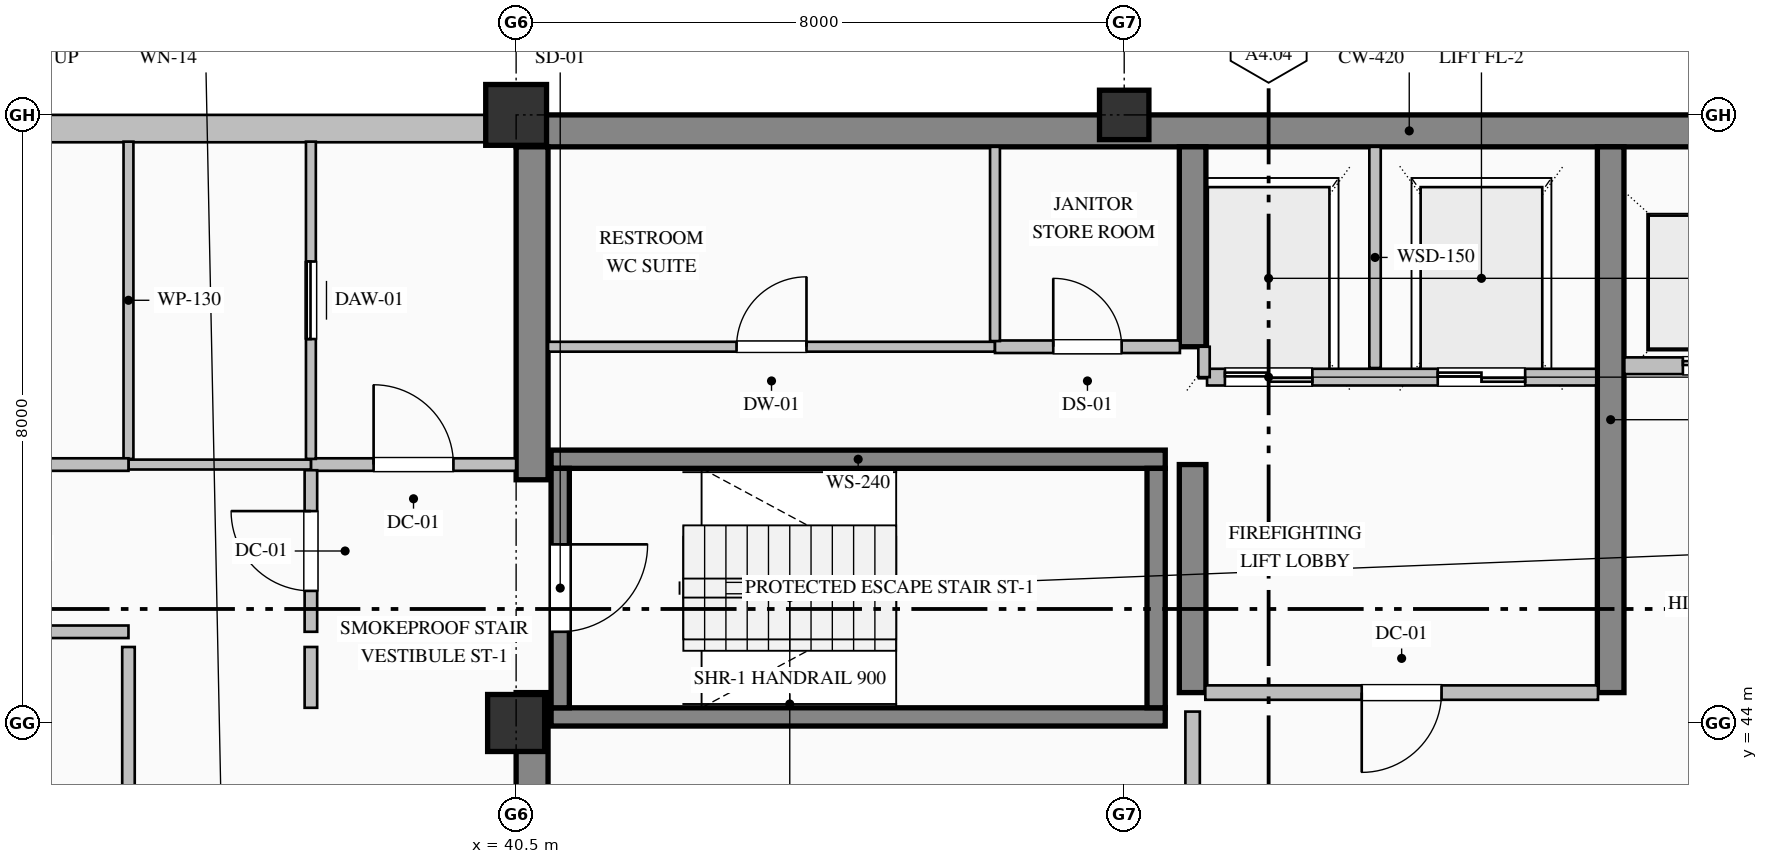
"""IFC4 building model, lengths in metres.
Left out: names, types, materials, properties, quantities, classifications, styles, units other than length and angle.
Written with IfcOpenShell. Run it as: python <this file> out.ifc"""

import sys

from ifc_helpers import new_model, si_unit, direction, frame, frame_2d, origin, origin_2d, place, context, subcontext, project, spatial, rectangle, hollow_rectangle, extrude, element, fill, save


model = new_model("IFC4")
c1 = context("Model", 3, precision=1e-05, world=origin(), true_north=direction((0.0, 1.0)))
c2 = subcontext(c1, "Body", "Model", "MODEL_VIEW")
j1 = project(units=[si_unit("LENGTHUNIT", "METRE"), si_unit("PLANEANGLEUNIT", "RADIAN")], contexts=[c1])
p1 = place(None, origin())
s1 = spatial("IfcSite", under=j1, at=p1, CompositionType="ELEMENT")
p2 = place(p1, origin())
s2 = spatial("IfcBuilding", under=s1, at=p2, CompositionType="ELEMENT")
p3 = place(p2, frame((0.0, 0.0, 323.2)))
s3 = spatial("IfcBuildingStorey", under=s2, at=p3, CompositionType="ELEMENT", Elevation=323.2)
p4 = place(p3, frame((40.5, 51.79, 0.0), z_axis=(0.0, 0.0, 1.0), x_axis=(1.0, 0.0, 0.0)))
e1 = element("IfcWall", 1, at=p4, inside=s3, PredefinedType="SHEAR", context=c2, shape_type="SweptSolid", body=[
    extrude(rectangle(XDim=23.5, YDim=0.42, at=frame_2d((11.75, 0.0))), origin(), (0.0, 0.0, 1.0), 3.785),
])
p5 = place(p3, frame((40.71, 36.42, 0.0), z_axis=(0.0, 0.0, 1.0), x_axis=(0.0, 1.0, 0.0)))
e2 = element("IfcWall", 2, at=p5, inside=s3, PredefinedType="SHEAR", context=c2, shape_type="SweptSolid", body=[
    extrude(rectangle(XDim=7.98, YDim=0.42, at=frame_2d((3.99, 0.0))), origin(), (0.0, 0.0, 1.0), 3.785),
])
p6 = place(p3, frame((40.71, 47.2, 0.0), z_axis=(0.0, 0.0, 1.0), x_axis=(0.0, 1.0, 0.0)))
e3 = element("IfcWall", 3, at=p6, inside=s3, PredefinedType="SHEAR", context=c2, shape_type="SweptSolid", body=[
    extrude(rectangle(XDim=4.38, YDim=0.42, at=frame_2d((2.19, 0.0))), origin(), (0.0, 0.0, 1.0), 3.785),
])
p7 = place(p3, frame((49.4, 44.4, 0.0), z_axis=(0.0, 0.0, 1.0), x_axis=(0.0, 1.0, 0.0)))
e4 = element("IfcWall", 4, at=p7, inside=s3, PredefinedType="SHEAR", context=c2, shape_type="SweptSolid", body=[
    extrude(rectangle(XDim=3.0, YDim=0.35, at=frame_2d((1.5, 0.0))), origin(), (0.0, 0.0, 1.0), 3.785),
])
p8 = place(p3, frame((49.4, 48.95, 0.0), z_axis=(0.0, 0.0, 1.0), x_axis=(0.0, 1.0, 0.0)))
e5 = element("IfcWall", 5, at=p8, inside=s3, PredefinedType="SHEAR", context=c2, shape_type="SweptSolid", body=[
    extrude(rectangle(XDim=2.63, YDim=0.35, at=frame_2d((1.315, 0.0))), origin(), (0.0, 0.0, 1.0), 3.785),
])
p9 = place(p3, frame((54.9, 44.4, 0.0), z_axis=(0.0, 0.0, 1.0), x_axis=(0.0, 1.0, 0.0)))
e6 = element("IfcWall", 6, at=p9, inside=s3, PredefinedType="SHEAR", context=c2, shape_type="SweptSolid", body=[
    extrude(rectangle(XDim=7.18, YDim=0.35, at=frame_2d((3.59, 0.0))), origin(), (0.0, 0.0, 1.0), 3.785),
])
p10 = place(p3, frame((40.5, 44.0, 0.0), z_axis=(0.0, 0.0, 1.0), x_axis=(1.0, 0.0, 0.0)))
e7 = element("IfcColumn", 7, at=p10, inside=s3, PredefinedType="COLUMN", context=c2, shape_type="SweptSolid", body=[
    extrude(rectangle(XDim=0.75, YDim=0.75, at=origin_2d()), origin(), (0.0, 0.0, 1.0), 4.0),
])
p11 = place(p3, frame((40.5, 52.0, 0.0), z_axis=(0.0, 0.0, 1.0), x_axis=(1.0, 0.0, 0.0)))
e8 = element("IfcColumn", 8, at=p11, inside=s3, PredefinedType="COLUMN", context=c2, shape_type="SweptSolid", body=[
    extrude(hollow_rectangle(XDim=0.8, YDim=0.8, WallThickness=0.032, at=origin_2d()), origin(), (0.0, 0.0, 1.0), 4.0),
])
p12 = place(p3, frame((48.5, 52.0, 0.0), z_axis=(0.0, 0.0, 1.0), x_axis=(1.0, 0.0, 0.0)))
e9 = element("IfcColumn", 9, at=p12, inside=s3, PredefinedType="COLUMN", context=c2, shape_type="SweptSolid", body=[
    extrude(hollow_rectangle(XDim=0.65, YDim=0.65, WallThickness=0.028, at=origin_2d()), origin(), (0.0, 0.0, 1.0), 4.0),
])
p13 = place(p3, frame((20.5, 51.82, 0.0), z_axis=(0.0, 0.0, 1.0), x_axis=(1.0, 0.0, 0.0)))
e10 = element("IfcWall", 10, at=p13, inside=s3, PredefinedType="SOLIDWALL", context=c2, shape_type="SweptSolid", body=[
    extrude(rectangle(XDim=20.02, YDim=0.36, at=frame_2d((10.01, 0.0))), origin(), (0.0, 0.0, 1.0), 3.335),
])
p14 = place(p13, frame((6.725, 0.0, 0.9)))
e11 = element("IfcOpeningElement", 11, at=p14, cuts=e10, PredefinedType="OPENING", context=c2, shape_type="SweptSolid", body=[
    extrude(rectangle(XDim=0.95, YDim=1.85, at=frame_2d((0.475, 0.925))), frame((0.0, 0.19, 0.0), z_axis=(0.0, -1.0, 0.0), x_axis=(1.0, 0.0, 0.0)), (0.0, 0.0, 1.0), 0.38),
])
for number, where, z_axis, x_axis in (
    (12, (40.96, 47.47, 0.0), (0.0, 0.0, 1.0), (1.0, 0.0, 0.0)),
    (13, (49.04, 44.08, 0.0), (0.0, 0.0, 1.0), (-1.0, 0.0, 0.0)),
):
    element("IfcWall", number, at=place(p3, frame(where, z_axis=z_axis, x_axis=x_axis)), inside=s3, PredefinedType="SOLIDWALL", context=c2, shape_type="SweptSolid", body=[
        extrude(rectangle(XDim=8.08, YDim=0.24, at=frame_2d((4.04, 0.0))), origin(), (0.0, 0.0, 1.0), 4.0),
    ])
p15 = place(p3, frame((41.08, 47.35, 0.0), z_axis=(0.0, 0.0, 1.0), x_axis=(0.0, -1.0, 0.0)))
e14 = element("IfcWall", 14, at=p15, inside=s3, PredefinedType="SOLIDWALL", context=c2, shape_type="SweptSolid", body=[
    extrude(rectangle(XDim=3.15, YDim=0.24, at=frame_2d((1.575, 0.0))), origin(), (0.0, 0.0, 1.0), 4.0),
])
p16 = place(p15, frame((1.0, 0.0, 0.0)))
e15 = element("IfcOpeningElement", 15, at=p16, cuts=e14, PredefinedType="OPENING", context=c2, shape_type="SweptSolid", body=[
    extrude(rectangle(XDim=1.15, YDim=2.2, at=frame_2d((0.575, 1.1))), frame((0.0, 0.13, 0.0), z_axis=(0.0, -1.0, 0.0), x_axis=(1.0, 0.0, 0.0)), (0.0, 0.0, 1.0), 0.26),
])
p17 = place(p3, frame((48.92, 44.2, 0.0), z_axis=(0.0, 0.0, 1.0), x_axis=(0.0, 1.0, 0.0)))
e16 = element("IfcWall", 16, at=p17, inside=s3, PredefinedType="SOLIDWALL", context=c2, shape_type="SweptSolid", body=[
    extrude(rectangle(XDim=3.15, YDim=0.24, at=frame_2d((1.575, 0.0))), origin(), (0.0, 0.0, 1.0), 4.0),
])
p18 = place(p3, frame((54.71, 48.55, 0.0), z_axis=(0.0, 0.0, 1.0), x_axis=(-1.0, 0.0, 0.0)))
e17 = element("IfcWall", 17, at=p18, inside=s3, PredefinedType="PARTITIONING", context=c2, shape_type="SweptSolid", body=[
    extrude(rectangle(XDim=5.12, YDim=0.22, at=frame_2d((2.56, 0.0))), origin(), (0.0, 0.0, 1.0), 3.785),
])
p19 = place(p18, frame((3.735, 0.0, 0.0)))
e18 = element("IfcOpeningElement", 18, at=p19, cuts=e17, PredefinedType="OPENING", context=c2, shape_type="SweptSolid", body=[
    extrude(rectangle(XDim=1.15, YDim=2.2, at=frame_2d((0.575, 1.1))), frame((0.0, 0.12, 0.0), z_axis=(0.0, -1.0, 0.0), x_axis=(1.0, 0.0, 0.0)), (0.0, 0.0, 1.0), 0.24),
])
p20 = place(p18, frame((0.935, 0.0, 0.0)))
e19 = element("IfcOpeningElement", 19, at=p20, cuts=e17, PredefinedType="OPENING", context=c2, shape_type="SweptSolid", body=[
    extrude(rectangle(XDim=1.15, YDim=2.2, at=frame_2d((0.575, 1.1))), frame((0.0, 0.12, 0.0), z_axis=(0.0, -1.0, 0.0), x_axis=(1.0, 0.0, 0.0)), (0.0, 0.0, 1.0), 0.24),
])
p21 = place(p3, frame((51.8, 48.67, 0.0), z_axis=(0.0, 0.0, 1.0), x_axis=(0.0, 1.0, 0.0)))
e20 = element("IfcWall", 20, at=p21, inside=s3, PredefinedType="PARTITIONING", context=c2, shape_type="SweptSolid", body=[
    extrude(rectangle(XDim=2.91, YDim=0.15, at=frame_2d((1.455, 0.0))), origin(), (0.0, 0.0, 1.0), 3.785),
])
p22 = place(p3, frame((49.55, 48.55, 0.0), z_axis=(0.0, 0.0, 1.0), x_axis=(0.0, 1.0, 0.0)))
e21 = element("IfcWall", 21, at=p22, inside=s3, PredefinedType="PARTITIONING", context=c2, shape_type="SweptSolid", body=[
    extrude(rectangle(XDim=0.4, YDim=0.15, at=frame_2d((0.2, 0.0))), origin(), (0.0, 0.0, 1.0), 3.785),
])
p23 = place(p3, frame((63.32, 48.7, 0.0), z_axis=(0.0, 0.0, 1.0), x_axis=(-1.0, 0.0, 0.0)))
e22 = element("IfcWall", 22, at=p23, inside=s3, PredefinedType="PARTITIONING", context=c2, shape_type="SweptSolid", body=[
    extrude(rectangle(XDim=8.24, YDim=0.22, at=frame_2d((4.12, 0.0))), origin(), (0.0, 0.0, 1.0), 3.785),
])
p24 = place(p23, frame((6.37, 0.0, 0.0)))
e23 = element("IfcOpeningElement", 23, at=p24, cuts=e22, PredefinedType="OPENING", context=c2, shape_type="SweptSolid", body=[
    extrude(rectangle(XDim=1.1, YDim=2.2, at=frame_2d((0.55, 1.1))), frame((0.0, 0.12, 0.0), z_axis=(0.0, -1.0, 0.0), x_axis=(1.0, 0.0, 0.0)), (0.0, 0.0, 1.0), 0.24),
])
p25 = place(p23, frame((3.57, 0.0, 0.0)))
e24 = element("IfcOpeningElement", 24, at=p25, cuts=e22, PredefinedType="OPENING", context=c2, shape_type="SweptSolid", body=[
    extrude(rectangle(XDim=1.1, YDim=2.2, at=frame_2d((0.55, 1.1))), frame((0.0, 0.12, 0.0), z_axis=(0.0, -1.0, 0.0), x_axis=(1.0, 0.0, 0.0)), (0.0, 0.0, 1.0), 0.24),
])
p26 = place(p23, frame((0.77, 0.0, 0.0)))
e25 = element("IfcOpeningElement", 25, at=p26, cuts=e22, PredefinedType="OPENING", context=c2, shape_type="SweptSolid", body=[
    extrude(rectangle(XDim=1.1, YDim=2.2, at=frame_2d((0.55, 1.1))), frame((0.0, 0.12, 0.0), z_axis=(0.0, -1.0, 0.0), x_axis=(1.0, 0.0, 0.0)), (0.0, 0.0, 1.0), 0.24),
])
p27 = place(p3, frame((37.8, 47.4, 0.0), z_axis=(0.0, 0.0, 1.0), x_axis=(1.0, 0.0, 0.0)))
e26 = element("IfcWall", 26, at=p27, inside=s3, PredefinedType="PARTITIONING", context=c2, shape_type="SweptSolid", body=[
    extrude(rectangle(XDim=2.7, YDim=0.165, at=frame_2d((1.35, 0.0))), origin(), (0.0, 0.0, 1.0), 3.785),
])
p28 = place(p27, frame((0.825, 0.0, 0.0)))
e27 = element("IfcOpeningElement", 27, at=p28, cuts=e26, PredefinedType="OPENING", context=c2, shape_type="SweptSolid", body=[
    extrude(rectangle(XDim=1.05, YDim=2.15, at=frame_2d((0.525, 1.075))), frame((0.0, 0.093, 0.0), z_axis=(0.0, -1.0, 0.0), x_axis=(1.0, 0.0, 0.0)), (0.0, 0.0, 1.0), 0.185),
])
p29 = place(p3, frame((37.8, 45.2, 0.0), z_axis=(0.0, 0.0, 1.0), x_axis=(0.0, 1.0, 0.0)))
e28 = element("IfcWall", 28, at=p29, inside=s3, PredefinedType="PARTITIONING", context=c2, shape_type="SweptSolid", body=[
    extrude(rectangle(XDim=2.125, YDim=0.165, at=frame_2d((1.063, 0.0))), origin(), (0.0, 0.0, 1.0), 3.785),
])
p30 = place(p29, frame((0.538, 0.0, 0.0)))
e29 = element("IfcOpeningElement", 29, at=p30, cuts=e28, PredefinedType="OPENING", context=c2, shape_type="SweptSolid", body=[
    extrude(rectangle(XDim=1.05, YDim=2.15, at=frame_2d((0.525, 1.075))), frame((0.0, 0.093, 0.0), z_axis=(0.0, -1.0, 0.0), x_axis=(1.0, 0.0, 0.0)), (0.0, 0.0, 1.0), 0.185),
])
p31 = place(p3, frame((37.8, 44.2, 0.0), z_axis=(0.0, 0.0, 1.0), x_axis=(0.0, 1.0, 0.0)))
e30 = element("IfcWall", 30, at=p31, inside=s3, PredefinedType="PARTITIONING", context=c2, shape_type="SweptSolid", body=[
    extrude(rectangle(XDim=0.8, YDim=0.165, at=frame_2d((0.4, 0.0))), origin(), (0.0, 0.0, 1.0), 3.785),
])
p32 = place(p3, frame((37.8, 47.475, 0.0), z_axis=(0.0, 0.0, 1.0), x_axis=(0.0, 1.0, 0.0)))
e31 = element("IfcWall", 31, at=p32, inside=s3, PredefinedType="PARTITIONING", context=c2, shape_type="SweptSolid", body=[
    extrude(rectangle(XDim=4.173, YDim=0.13, at=frame_2d((2.087, 0.0))), origin(), (0.0, 0.0, 1.0), 3.785),
])
p33 = place(p32, frame((1.577, 0.0, 0.0)))
e32 = element("IfcOpeningElement", 32, at=p33, cuts=e31, PredefinedType="OPENING", context=c2, shape_type="SweptSolid", body=[
    extrude(rectangle(XDim=1.02, YDim=2.15, at=frame_2d((0.51, 1.075))), frame((0.0, 0.075, 0.0), z_axis=(0.0, -1.0, 0.0), x_axis=(1.0, 0.0, 0.0)), (0.0, 0.0, 1.0), 0.15),
])
p34 = place(p3, frame((37.8, 47.4, 0.0), z_axis=(0.0, 0.0, 1.0), x_axis=(-1.0, 0.0, 0.0)))
e33 = element("IfcWall", 33, at=p34, inside=s3, PredefinedType="PARTITIONING", context=c2, shape_type="SweptSolid", body=[
    extrude(rectangle(XDim=2.4, YDim=0.13, at=frame_2d((1.2, 0.0))), origin(), (0.0, 0.0, 1.0), 3.785),
])
p35 = place(p3, frame((35.4, 47.475, 0.0), z_axis=(0.0, 0.0, 1.0), x_axis=(0.0, 1.0, 0.0)))
e34 = element("IfcWall", 34, at=p35, inside=s3, PredefinedType="PARTITIONING", context=c2, shape_type="SweptSolid", body=[
    extrude(rectangle(XDim=4.173, YDim=0.13, at=frame_2d((2.087, 0.0))), origin(), (0.0, 0.0, 1.0), 3.785),
])
p36 = place(p3, frame((40.92, 48.95, 0.0), z_axis=(0.0, 0.0, 1.0), x_axis=(1.0, 0.0, 0.0)))
e35 = element("IfcWall", 35, at=p36, inside=s3, PredefinedType="PARTITIONING", context=c2, shape_type="SweptSolid", body=[
    extrude(rectangle(XDim=5.88, YDim=0.13, at=frame_2d((2.94, 0.0))), origin(), (0.0, 0.0, 1.0), 3.785),
])
p37 = place(p36, frame((2.48, 0.0, 0.0)))
e36 = element("IfcOpeningElement", 36, at=p37, cuts=e35, PredefinedType="OPENING", context=c2, shape_type="SweptSolid", body=[
    extrude(rectangle(XDim=0.92, YDim=2.15, at=frame_2d((0.46, 1.075))), frame((0.0, 0.075, 0.0), z_axis=(0.0, -1.0, 0.0), x_axis=(1.0, 0.0, 0.0)), (0.0, 0.0, 1.0), 0.15),
])
p38 = place(p3, frame((46.8, 48.95, 0.0), z_axis=(0.0, 0.0, 1.0), x_axis=(1.0, 0.0, 0.0)))
e37 = element("IfcWall", 37, at=p38, inside=s3, PredefinedType="PARTITIONING", context=c2, shape_type="SweptSolid", body=[
    extrude(rectangle(XDim=2.433, YDim=0.165, at=frame_2d((1.216, 0.0))), origin(), (0.0, 0.0, 1.0), 3.785),
])
p39 = place(p38, frame((0.767, 0.0, 0.0)))
e38 = element("IfcOpeningElement", 38, at=p39, cuts=e37, PredefinedType="OPENING", context=c2, shape_type="SweptSolid", body=[
    extrude(rectangle(XDim=0.9, YDim=2.15, at=frame_2d((0.45, 1.075))), frame((0.0, 0.093, 0.0), z_axis=(0.0, -1.0, 0.0), x_axis=(1.0, 0.0, 0.0)), (0.0, 0.0, 1.0), 0.185),
])
p40 = place(p3, frame((54.733, 44.4, 0.0), z_axis=(0.0, 0.0, 1.0), x_axis=(-1.0, 0.0, 0.0)))
e39 = element("IfcWall", 39, at=p40, inside=s3, PredefinedType="PARTITIONING", context=c2, shape_type="SweptSolid", body=[
    extrude(rectangle(XDim=5.166, YDim=0.19, at=frame_2d((2.583, 0.0))), origin(), (0.0, 0.0, 1.0), 3.785),
])
p41 = place(p40, frame((2.058, 0.0, 0.0)))
e40 = element("IfcOpeningElement", 40, at=p41, cuts=e39, PredefinedType="OPENING", context=c2, shape_type="SweptSolid", body=[
    extrude(rectangle(XDim=1.05, YDim=2.15, at=frame_2d((0.525, 1.075))), frame((0.0, 0.105, 0.0), z_axis=(0.0, -1.0, 0.0), x_axis=(1.0, 0.0, 0.0)), (0.0, 0.0, 1.0), 0.21),
])
p42 = place(p3, frame((49.4, 40.487, 0.0), z_axis=(0.0, 0.0, 1.0), x_axis=(0.0, 1.0, 0.0)))
e41 = element("IfcWall", 41, at=p42, inside=s3, PredefinedType="PARTITIONING", context=c2, shape_type="SweptSolid", body=[
    extrude(rectangle(XDim=3.663, YDim=0.19, at=frame_2d((1.832, 0.0))), origin(), (0.0, 0.0, 1.0), 3.027),
])
p43 = place(p42, frame((1.132, 0.0, 0.0)))
e42 = element("IfcOpeningElement", 42, at=p43, cuts=e41, PredefinedType="OPENING", context=c2, shape_type="SweptSolid", body=[
    extrude(rectangle(XDim=1.4, YDim=2.25, at=frame_2d((0.7, 1.125))), frame((0.0, 0.105, 0.0), z_axis=(0.0, -1.0, 0.0), x_axis=(1.0, 0.0, 0.0)), (0.0, 0.0, 1.0), 0.21),
])
p44 = place(p3, frame((46.8, 51.58, 0.0), z_axis=(0.0, 0.0, 1.0), x_axis=(0.0, -1.0, 0.0)))
e43 = element("IfcWall", 43, at=p44, inside=s3, PredefinedType="PARTITIONING", context=c2, shape_type="SweptSolid", body=[
    extrude(rectangle(XDim=2.556, YDim=0.13, at=frame_2d((1.278, 0.0))), origin(), (0.0, 0.0, 1.0), 3.785),
])
p45 = place(p3, frame((24.5, 47.4, 0.0), z_axis=(0.0, 0.0, 1.0), x_axis=(1.0, 0.0, 0.0)))
e44 = element("IfcWall", 44, at=p45, inside=s3, PredefinedType="PARTITIONING", context=c2, shape_type="SweptSolid", body=[
    extrude(rectangle(XDim=10.9, YDim=0.165, at=frame_2d((5.45, 0.0))), origin(), (0.0, 0.0, 1.0), 3.785),
])
p46 = place(p45, frame((5.0, 0.0, 0.0)))
e45 = element("IfcOpeningElement", 45, at=p46, cuts=e44, PredefinedType="OPENING", context=c2, shape_type="SweptSolid", body=[
    extrude(rectangle(XDim=0.9, YDim=2.15, at=frame_2d((0.45, 1.075))), frame((0.0, 0.093, 0.0), z_axis=(0.0, -1.0, 0.0), x_axis=(1.0, 0.0, 0.0)), (0.0, 0.0, 1.0), 0.185),
])
p47 = place(p3, frame((35.4, 45.2, 0.0), z_axis=(0.0, 0.0, 1.0), x_axis=(-1.0, 0.0, 0.0)))
e46 = element("IfcWall", 46, at=p47, inside=s3, PredefinedType="PARTITIONING", context=c2, shape_type="SweptSolid", body=[
    extrude(rectangle(XDim=4.4, YDim=0.165, at=frame_2d((2.2, 0.0))), origin(), (0.0, 0.0, 1.0), 3.785),
])
p48 = place(p3, frame((35.4, 33.6, 0.0), z_axis=(0.0, 0.0, 1.0), x_axis=(0.0, 1.0, 0.0)))
e47 = element("IfcWall", 47, at=p48, inside=s3, PredefinedType="PARTITIONING", context=c2, shape_type="SweptSolid", body=[
    extrude(rectangle(XDim=11.4, YDim=0.165, at=frame_2d((5.7, 0.0))), origin(), (0.0, 0.0, 1.0), 3.785),
])
p49 = place(p48, frame((5.2, 0.0, 0.0)))
e48 = element("IfcOpeningElement", 48, at=p49, cuts=e47, PredefinedType="OPENING", context=c2, shape_type="SweptSolid", body=[
    extrude(rectangle(XDim=1.0, YDim=2.15, at=frame_2d((0.5, 1.075))), frame((0.0, 0.093, 0.0), z_axis=(0.0, -1.0, 0.0), x_axis=(1.0, 0.0, 0.0)), (0.0, 0.0, 1.0), 0.185),
])
p50 = place(p16, origin())
e49 = element("IfcDoor", 49, at=p50, inside=s3, OperationType="SINGLE_SWING_LEFT", PredefinedType="DOOR", context=c2, shape_type="SweptSolid", body=[
    extrude(rectangle(XDim=1.15, YDim=2.2, at=frame_2d((0.575, 1.1))), frame((0.0, 0.025, 0.0), z_axis=(0.0, -1.0, 0.0), x_axis=(1.0, 0.0, 0.0)), (0.0, 0.0, 1.0), 0.05),
])
fill(e15, e49)
p51 = place(p19, origin())
e50 = element("IfcDoor", 50, at=p51, inside=s3, OperationType="DOUBLE_DOOR_SLIDING", PredefinedType="DOOR", context=c2, shape_type="SweptSolid", body=[
    extrude(rectangle(XDim=1.15, YDim=2.2, at=frame_2d((0.575, 1.1))), frame((0.0, 0.025, 0.0), z_axis=(0.0, -1.0, 0.0), x_axis=(1.0, 0.0, 0.0)), (0.0, 0.0, 1.0), 0.05),
])
fill(e18, e50)
p52 = place(p20, origin())
e51 = element("IfcDoor", 51, at=p52, inside=s3, OperationType="DOUBLE_DOOR_SLIDING", PredefinedType="DOOR", context=c2, shape_type="SweptSolid", body=[
    extrude(rectangle(XDim=1.15, YDim=2.2, at=frame_2d((0.575, 1.1))), frame((0.0, 0.025, 0.0), z_axis=(0.0, -1.0, 0.0), x_axis=(1.0, 0.0, 0.0)), (0.0, 0.0, 1.0), 0.05),
])
fill(e19, e51)
p53 = place(p24, origin())
e52 = element("IfcDoor", 52, at=p53, inside=s3, OperationType="DOUBLE_DOOR_SLIDING", PredefinedType="DOOR", context=c2, shape_type="SweptSolid", body=[
    extrude(rectangle(XDim=1.1, YDim=2.2, at=frame_2d((0.55, 1.1))), frame((0.0, 0.025, 0.0), z_axis=(0.0, -1.0, 0.0), x_axis=(1.0, 0.0, 0.0)), (0.0, 0.0, 1.0), 0.05),
])
fill(e23, e52)
p54 = place(p41, origin())
e53 = element("IfcDoor", 53, at=p54, inside=s3, OperationType="SINGLE_SWING_RIGHT", PredefinedType="DOOR", context=c2, shape_type="SweptSolid", body=[
    extrude(rectangle(XDim=1.05, YDim=2.15, at=frame_2d((0.525, 1.075))), frame((0.0, 0.025, 0.0), z_axis=(0.0, -1.0, 0.0), x_axis=(1.0, 0.0, 0.0)), (0.0, 0.0, 1.0), 0.05),
])
fill(e40, e53)
p55 = place(p28, origin())
e54 = element("IfcDoor", 54, at=p55, inside=s3, OperationType="SINGLE_SWING_LEFT", PredefinedType="DOOR", context=c2, shape_type="SweptSolid", body=[
    extrude(rectangle(XDim=1.05, YDim=2.15, at=frame_2d((0.525, 1.075))), frame((0.0, 0.025, 0.0), z_axis=(0.0, -1.0, 0.0), x_axis=(1.0, 0.0, 0.0)), (0.0, 0.0, 1.0), 0.05),
])
fill(e27, e54)
p56 = place(p30, origin())
e55 = element("IfcDoor", 55, at=p56, inside=s3, OperationType="SINGLE_SWING_RIGHT", PredefinedType="DOOR", context=c2, shape_type="SweptSolid", body=[
    extrude(rectangle(XDim=1.05, YDim=2.15, at=frame_2d((0.525, 1.075))), frame((0.0, 0.025, 0.0), z_axis=(0.0, -1.0, 0.0), x_axis=(1.0, 0.0, 0.0)), (0.0, 0.0, 1.0), 0.05),
])
fill(e29, e55)
p57 = place(p33, origin())
e56 = element("IfcDoor", 56, at=p57, inside=s3, OperationType="SLIDING_TO_LEFT", PredefinedType="DOOR", context=c2, shape_type="SweptSolid", body=[
    extrude(rectangle(XDim=1.02, YDim=2.15, at=frame_2d((0.51, 1.075))), frame((0.0, 0.025, 0.0), z_axis=(0.0, -1.0, 0.0), x_axis=(1.0, 0.0, 0.0)), (0.0, 0.0, 1.0), 0.05),
])
fill(e32, e56)
p58 = place(p37, origin())
e57 = element("IfcDoor", 57, at=p58, inside=s3, OperationType="SINGLE_SWING_RIGHT", PredefinedType="DOOR", context=c2, shape_type="SweptSolid", body=[
    extrude(rectangle(XDim=0.92, YDim=2.15, at=frame_2d((0.46, 1.075))), frame((0.0, 0.025, 0.0), z_axis=(0.0, -1.0, 0.0), x_axis=(1.0, 0.0, 0.0)), (0.0, 0.0, 1.0), 0.05),
])
fill(e36, e57)
p59 = place(p39, origin())
e58 = element("IfcDoor", 58, at=p59, inside=s3, OperationType="SINGLE_SWING_LEFT", PredefinedType="DOOR", context=c2, shape_type="SweptSolid", body=[
    extrude(rectangle(XDim=0.9, YDim=2.15, at=frame_2d((0.45, 1.075))), frame((0.0, 0.025, 0.0), z_axis=(0.0, -1.0, 0.0), x_axis=(1.0, 0.0, 0.0)), (0.0, 0.0, 1.0), 0.05),
])
fill(e38, e58)
save(model, sys.argv[1])
